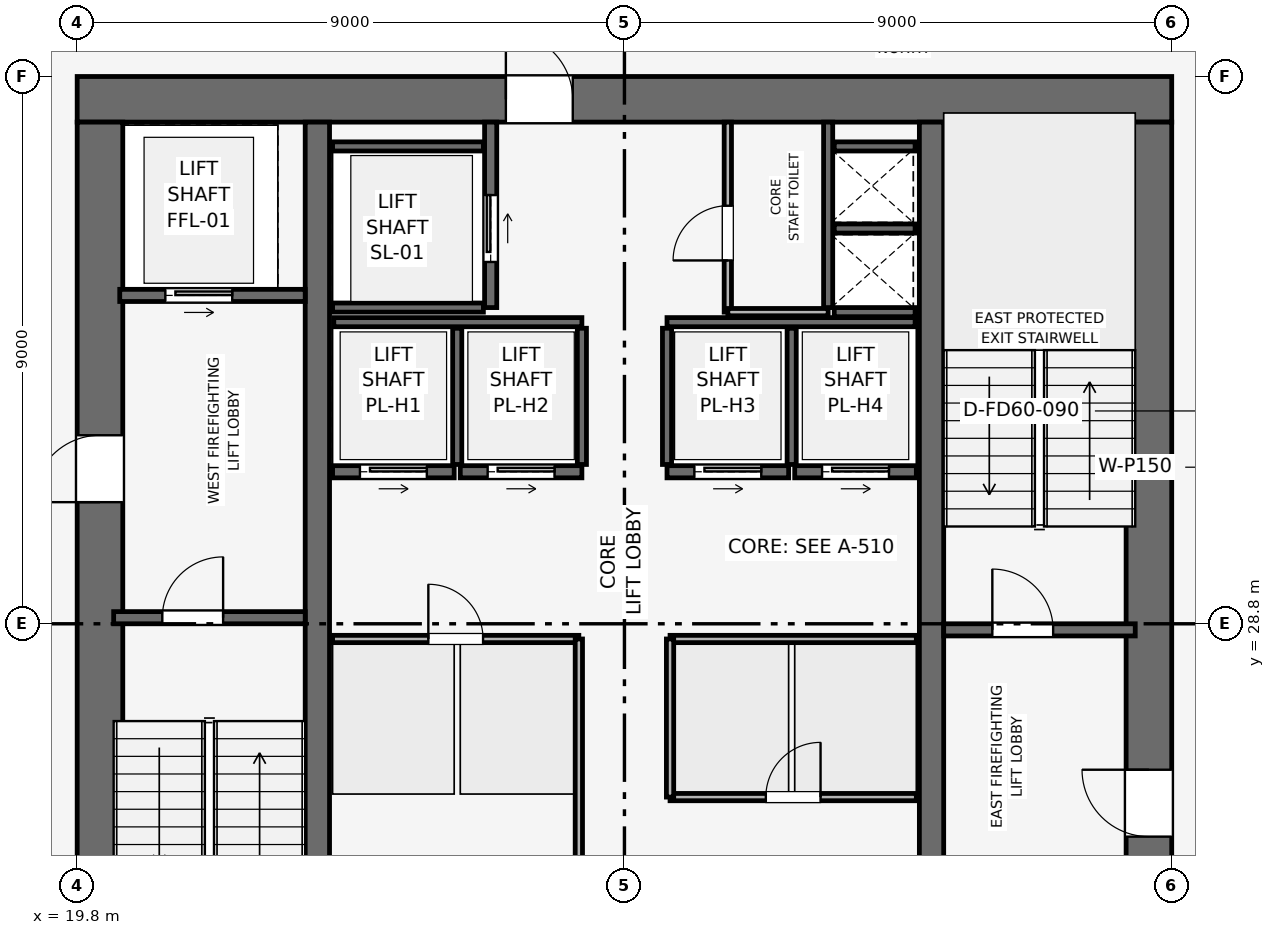
"""IFC4 building model, lengths in metres.
Left out: names, types, materials, properties, quantities, classifications, styles, units other than length and angle.
Written with IfcOpenShell. Run it as: python <this file> out.ifc"""

import sys

from ifc_helpers import new_model, si_unit, direction, frame, frame_2d, origin, place, context, subcontext, project, spatial, rectangle, extrude, element, fill, save


model = new_model("IFC4")
c1 = context("Model", 3, precision=1e-05, world=origin(), true_north=direction((0.0, 1.0)))
c2 = subcontext(c1, "Body", "Model", "MODEL_VIEW")
j1 = project(units=[si_unit("LENGTHUNIT", "METRE"), si_unit("PLANEANGLEUNIT", "RADIAN")], contexts=[c1])
p1 = place(None, origin())
s1 = spatial("IfcSite", under=j1, at=p1, CompositionType="ELEMENT")
p2 = place(p1, origin())
s2 = spatial("IfcBuilding", under=s1, at=p2, CompositionType="ELEMENT")
p3 = place(p2, frame((0.0, 0.0, 254.1)))
s3 = spatial("IfcBuildingStorey", under=s2, at=p3, CompositionType="ELEMENT", Elevation=254.1)
p4 = place(p3, frame((19.8, 37.425, 0.0), z_axis=(0.0, 0.0, 1.0), x_axis=(1.0, 0.0, 0.0)))
e1 = element("IfcWall", 1, at=p4, inside=s3, PredefinedType="SHEAR", context=c2, shape_type="SweptSolid", body=[
    extrude(rectangle(XDim=18.0, YDim=0.75, at=frame_2d((9.0, 0.0))), origin(), (0.0, 0.0, 1.0), 3.75),
])
p5 = place(p4, frame((7.05, 0.0, 0.0)))
e2 = element("IfcOpeningElement", 2, at=p5, cuts=e1, PredefinedType="OPENING", context=c2, shape_type="SweptSolid", body=[
    extrude(rectangle(XDim=1.1, YDim=2.15, at=frame_2d((0.55, 1.075))), frame((0.0, 0.385, 0.0), z_axis=(0.0, -1.0, 0.0), x_axis=(1.0, 0.0, 0.0)), (0.0, 0.0, 1.0), 0.77),
])
p6 = place(p3, frame((20.175, 20.55, 0.0), z_axis=(0.0, 0.0, 1.0), x_axis=(0.0, 1.0, 0.0)))
e3 = element("IfcWall", 3, at=p6, inside=s3, PredefinedType="SHEAR", context=c2, shape_type="SweptSolid", body=[
    extrude(rectangle(XDim=16.5, YDim=0.75, at=frame_2d((8.25, 0.0))), origin(), (0.0, 0.0, 1.0), 3.75),
])
p7 = place(p6, frame((10.25, 0.0, 0.0)))
e4 = element("IfcOpeningElement", 4, at=p7, cuts=e3, PredefinedType="OPENING", context=c2, shape_type="SweptSolid", body=[
    extrude(rectangle(XDim=1.1, YDim=2.15, at=frame_2d((0.55, 1.075))), frame((0.0, 0.385, 0.0), z_axis=(0.0, -1.0, 0.0), x_axis=(1.0, 0.0, 0.0)), (0.0, 0.0, 1.0), 0.77),
])
p8 = place(p3, frame((37.425, 20.55, 0.0), z_axis=(0.0, 0.0, 1.0), x_axis=(0.0, 1.0, 0.0)))
e5 = element("IfcWall", 5, at=p8, inside=s3, PredefinedType="SHEAR", context=c2, shape_type="SweptSolid", body=[
    extrude(rectangle(XDim=16.5, YDim=0.75, at=frame_2d((8.25, 0.0))), origin(), (0.0, 0.0, 1.0), 3.75),
])
p9 = place(p8, frame((4.75, 0.0, 0.0)))
e6 = element("IfcOpeningElement", 6, at=p9, cuts=e5, PredefinedType="OPENING", context=c2, shape_type="SweptSolid", body=[
    extrude(rectangle(XDim=1.1, YDim=2.15, at=frame_2d((0.55, 1.075))), frame((0.0, 0.385, 0.0), z_axis=(0.0, -1.0, 0.0), x_axis=(1.0, 0.0, 0.0)), (0.0, 0.0, 1.0), 0.77),
])
for number, where, z_axis, x_axis in (
    (7, (23.75, 20.55, 0.0), (0.0, 0.0, 1.0), (0.0, 1.0, 0.0)),
    (8, (33.85, 20.55, 0.0), (0.0, 0.0, 1.0), (0.0, 1.0, 0.0)),
):
    element("IfcWall", number, at=place(p3, frame(where, z_axis=z_axis, x_axis=x_axis)), inside=s3, PredefinedType="SHEAR", context=c2, shape_type="SweptSolid", body=[
        extrude(rectangle(XDim=16.5, YDim=0.4, at=frame_2d((8.25, 0.0))), origin(), (0.0, 0.0, 1.0), 3.75),
    ])
p10 = place(p3, frame((20.4, 28.9, 0.0), z_axis=(0.0, 0.0, 1.0), x_axis=(1.0, 0.0, 0.0)))
e9 = element("IfcWall", 9, at=p10, inside=s3, PredefinedType="SHEAR", context=c2, shape_type="SweptSolid", body=[
    extrude(rectangle(XDim=3.15, YDim=0.2, at=frame_2d((1.575, 0.0))), origin(), (0.0, 0.0, 1.0), 3.5),
])
p11 = place(p10, frame((0.8, 0.0, 0.0)))
e10 = element("IfcOpeningElement", 10, at=p11, cuts=e9, PredefinedType="OPENING", context=c2, shape_type="SweptSolid", body=[
    extrude(rectangle(XDim=1.0, YDim=2.1, at=frame_2d((0.5, 1.05))), frame((0.0, 0.11, 0.0), z_axis=(0.0, -1.0, 0.0), x_axis=(1.0, 0.0, 0.0)), (0.0, 0.0, 1.0), 0.22),
])
p12 = place(p3, frame((34.05, 28.7, 0.0), z_axis=(0.0, 0.0, 1.0), x_axis=(1.0, 0.0, 0.0)))
e11 = element("IfcWall", 11, at=p12, inside=s3, PredefinedType="SHEAR", context=c2, shape_type="SweptSolid", body=[
    extrude(rectangle(XDim=3.15, YDim=0.2, at=frame_2d((1.575, 0.0))), origin(), (0.0, 0.0, 1.0), 3.5),
])
p13 = place(p12, frame((0.8, 0.0, 0.0)))
e12 = element("IfcOpeningElement", 12, at=p13, cuts=e11, PredefinedType="OPENING", context=c2, shape_type="SweptSolid", body=[
    extrude(rectangle(XDim=1.0, YDim=2.1, at=frame_2d((0.5, 1.05))), frame((0.0, 0.11, 0.0), z_axis=(0.0, -1.0, 0.0), x_axis=(1.0, 0.0, 0.0)), (0.0, 0.0, 1.0), 0.22),
])
p14 = place(p3, frame((32.15, 34.0, 0.0), z_axis=(0.0, 0.0, 1.0), x_axis=(0.0, 1.0, 0.0)))
e13 = element("IfcWall", 13, at=p14, inside=s3, PredefinedType="SHEAR", context=c2, shape_type="SweptSolid", body=[
    extrude(rectangle(XDim=3.05, YDim=0.15, at=frame_2d((1.525, 0.0))), origin(), (0.0, 0.0, 1.0), 3.5),
])
for number, where, z_axis, x_axis in (
    (14, (32.25, 33.925, 0.0), (0.0, 0.0, 1.0), (1.0, 0.0, 0.0)),
    (15, (32.25, 35.3, 0.0), (0.0, 0.0, 1.0), (1.0, 0.0, 0.0)),
):
    element("IfcWall", number, at=place(p3, frame(where, z_axis=z_axis, x_axis=x_axis)), inside=s3, PredefinedType="SHEAR", context=c2, shape_type="SweptSolid", body=[
        extrude(rectangle(XDim=1.33, YDim=0.15, at=frame_2d((0.665, 0.0))), origin(), (0.0, 0.0, 1.0), 3.5),
    ])
p15 = place(p3, frame((20.5, 34.2, 0.0), z_axis=(0.0, 0.0, 1.0), x_axis=(1.0, 0.0, 0.0)))
e16 = element("IfcWall", 16, at=p15, inside=s3, PredefinedType="SHEAR", context=c2, shape_type="SweptSolid", body=[
    extrude(rectangle(XDim=3.05, YDim=0.2, at=frame_2d((1.525, 0.0))), origin(), (0.0, 0.0, 1.0), 3.5),
])
p16 = place(p15, frame((0.75, 0.0, 0.0)))
e17 = element("IfcOpeningElement", 17, at=p16, cuts=e16, PredefinedType="OPENING", context=c2, shape_type="SweptSolid", body=[
    extrude(rectangle(XDim=1.1, YDim=2.15, at=frame_2d((0.55, 1.075))), frame((0.0, 0.11, 0.0), z_axis=(0.0, -1.0, 0.0), x_axis=(1.0, 0.0, 0.0)), (0.0, 0.0, 1.0), 0.22),
])
p17 = place(p3, frame((26.6, 34.0, 0.0), z_axis=(0.0, 0.0, 1.0), x_axis=(0.0, 1.0, 0.0)))
e18 = element("IfcWall", 18, at=p17, inside=s3, PredefinedType="SHEAR", context=c2, shape_type="SweptSolid", body=[
    extrude(rectangle(XDim=3.05, YDim=0.2, at=frame_2d((1.525, 0.0))), origin(), (0.0, 0.0, 1.0), 3.5),
])
p18 = place(p17, frame((0.75, 0.0, 0.0)))
e19 = element("IfcOpeningElement", 19, at=p18, cuts=e18, PredefinedType="OPENING", context=c2, shape_type="SweptSolid", body=[
    extrude(rectangle(XDim=1.1, YDim=2.15, at=frame_2d((0.55, 1.075))), frame((0.0, 0.11, 0.0), z_axis=(0.0, -1.0, 0.0), x_axis=(1.0, 0.0, 0.0)), (0.0, 0.0, 1.0), 0.22),
])
for number, where, z_axis, x_axis in (
    (20, (24.0, 34.0, 0.0), (0.0, 0.0, 1.0), (1.0, 0.0, 0.0)),
    (21, (24.0, 36.65, 0.0), (0.0, 0.0, 1.0), (1.0, 0.0, 0.0)),
):
    element("IfcWall", number, at=place(p3, frame(where, z_axis=z_axis, x_axis=x_axis)), inside=s3, PredefinedType="SHEAR", context=c2, shape_type="SweptSolid", body=[
        extrude(rectangle(XDim=2.48, YDim=0.15, at=frame_2d((1.24, 0.0))), origin(), (0.0, 0.0, 1.0), 3.5),
    ])
p19 = place(p3, frame((24.0, 31.3, 0.0), z_axis=(0.0, 0.0, 1.0), x_axis=(1.0, 0.0, 0.0)))
e22 = element("IfcWall", 22, at=p19, inside=s3, PredefinedType="SHEAR", context=c2, shape_type="SweptSolid", body=[
    extrude(rectangle(XDim=2.0, YDim=0.2, at=frame_2d((1.0, 0.0))), origin(), (0.0, 0.0, 1.0), 3.5),
])
p20 = place(p19, frame((0.45, 0.0, 0.0)))
e23 = element("IfcOpeningElement", 23, at=p20, cuts=e22, PredefinedType="OPENING", context=c2, shape_type="SweptSolid", body=[
    extrude(rectangle(XDim=1.1, YDim=2.15, at=frame_2d((0.55, 1.075))), frame((0.0, 0.11, 0.0), z_axis=(0.0, -1.0, 0.0), x_axis=(1.0, 0.0, 0.0)), (0.0, 0.0, 1.0), 0.22),
])
p21 = place(p3, frame((26.1, 31.3, 0.0), z_axis=(0.0, 0.0, 1.0), x_axis=(1.0, 0.0, 0.0)))
e24 = element("IfcWall", 24, at=p21, inside=s3, PredefinedType="SHEAR", context=c2, shape_type="SweptSolid", body=[
    extrude(rectangle(XDim=2.0, YDim=0.2, at=frame_2d((1.0, 0.0))), origin(), (0.0, 0.0, 1.0), 3.5),
])
p22 = place(p21, frame((0.45, 0.0, 0.0)))
e25 = element("IfcOpeningElement", 25, at=p22, cuts=e24, PredefinedType="OPENING", context=c2, shape_type="SweptSolid", body=[
    extrude(rectangle(XDim=1.1, YDim=2.15, at=frame_2d((0.55, 1.075))), frame((0.0, 0.11, 0.0), z_axis=(0.0, -1.0, 0.0), x_axis=(1.0, 0.0, 0.0)), (0.0, 0.0, 1.0), 0.22),
])
p23 = place(p3, frame((29.5, 31.3, 0.0), z_axis=(0.0, 0.0, 1.0), x_axis=(1.0, 0.0, 0.0)))
e26 = element("IfcWall", 26, at=p23, inside=s3, PredefinedType="SHEAR", context=c2, shape_type="SweptSolid", body=[
    extrude(rectangle(XDim=2.0, YDim=0.2, at=frame_2d((1.0, 0.0))), origin(), (0.0, 0.0, 1.0), 3.5),
])
p24 = place(p23, frame((0.45, 0.0, 0.0)))
e27 = element("IfcOpeningElement", 27, at=p24, cuts=e26, PredefinedType="OPENING", context=c2, shape_type="SweptSolid", body=[
    extrude(rectangle(XDim=1.1, YDim=2.15, at=frame_2d((0.55, 1.075))), frame((0.0, 0.11, 0.0), z_axis=(0.0, -1.0, 0.0), x_axis=(1.0, 0.0, 0.0)), (0.0, 0.0, 1.0), 0.22),
])
p25 = place(p3, frame((31.6, 31.3, 0.0), z_axis=(0.0, 0.0, 1.0), x_axis=(1.0, 0.0, 0.0)))
e28 = element("IfcWall", 28, at=p25, inside=s3, PredefinedType="SHEAR", context=c2, shape_type="SweptSolid", body=[
    extrude(rectangle(XDim=2.0, YDim=0.2, at=frame_2d((1.0, 0.0))), origin(), (0.0, 0.0, 1.0), 3.5),
])
p26 = place(p25, frame((0.45, 0.0, 0.0)))
e29 = element("IfcOpeningElement", 29, at=p26, cuts=e28, PredefinedType="OPENING", context=c2, shape_type="SweptSolid", body=[
    extrude(rectangle(XDim=1.1, YDim=2.15, at=frame_2d((0.55, 1.075))), frame((0.0, 0.11, 0.0), z_axis=(0.0, -1.0, 0.0), x_axis=(1.0, 0.0, 0.0)), (0.0, 0.0, 1.0), 0.22),
])
p27 = place(p3, frame((32.25, 36.65, 0.0), z_axis=(0.0, 0.0, 1.0), x_axis=(1.0, 0.0, 0.0)))
e30 = element("IfcWall", 30, at=p27, inside=s3, PredefinedType="SHEAR", context=c2, shape_type="SweptSolid", body=[
    extrude(rectangle(XDim=1.33, YDim=0.15, at=frame_2d((0.665, 0.0))), origin(), (0.0, 0.0, 1.0), 3.5),
])
for number, where, z_axis, x_axis in (
    (31, (24.02, 33.76, 0.0), (0.0, 0.0, 1.0), (1.0, 0.0, 0.0)),
    (32, (29.5, 33.76, 0.0), (0.0, 0.0, 1.0), (1.0, 0.0, 0.0)),
):
    element("IfcWall", number, at=place(p3, frame(where, z_axis=z_axis, x_axis=x_axis)), inside=s3, PredefinedType="SHEAR", context=c2, shape_type="SweptSolid", body=[
        extrude(rectangle(XDim=4.08, YDim=0.15, at=frame_2d((2.04, 0.0))), origin(), (0.0, 0.0, 1.0), 3.5),
    ])
for number, where, z_axis, x_axis in (
    (33, (26.05, 31.42, 0.0), (0.0, 0.0, 1.0), (0.0, 1.0, 0.0)),
    (34, (28.1, 31.42, 0.0), (0.0, 0.0, 1.0), (0.0, 1.0, 0.0)),
    (35, (29.5, 31.42, 0.0), (0.0, 0.0, 1.0), (0.0, 1.0, 0.0)),
    (36, (31.55, 31.42, 0.0), (0.0, 0.0, 1.0), (0.0, 1.0, 0.0)),
):
    element("IfcWall", number, at=place(p3, frame(where, z_axis=z_axis, x_axis=x_axis)), inside=s3, PredefinedType="SHEAR", context=c2, shape_type="SweptSolid", body=[
        extrude(rectangle(XDim=2.24, YDim=0.15, at=frame_2d((1.12, 0.0))), origin(), (0.0, 0.0, 1.0), 3.5),
    ])
p28 = place(p3, frame((30.5, 33.925, 0.0), z_axis=(0.0, 0.0, 1.0), x_axis=(0.0, 1.0, 0.0)))
e37 = element("IfcWall", 37, at=p28, inside=s3, PredefinedType="PARTITIONING", context=c2, shape_type="SweptSolid", body=[
    extrude(rectangle(XDim=3.125, YDim=0.12, at=frame_2d((1.562, 0.0))), origin(), (0.0, 0.0, 1.0), 3.5),
])
p29 = place(p28, frame((0.85, 0.0, 0.0)))
e38 = element("IfcOpeningElement", 38, at=p29, cuts=e37, PredefinedType="OPENING", context=c2, shape_type="SweptSolid", body=[
    extrude(rectangle(XDim=0.9, YDim=2.1, at=frame_2d((0.45, 1.05))), frame((0.0, 0.07, 0.0), z_axis=(0.0, -1.0, 0.0), x_axis=(1.0, 0.0, 0.0)), (0.0, 0.0, 1.0), 0.14),
])
p30 = place(p3, frame((30.5, 33.925, 0.0), z_axis=(0.0, 0.0, 1.0), x_axis=(1.0, 0.0, 0.0)))
e39 = element("IfcWall", 39, at=p30, inside=s3, PredefinedType="PARTITIONING", context=c2, shape_type="SweptSolid", body=[
    extrude(rectangle(XDim=1.65, YDim=0.12, at=frame_2d((0.825, 0.0))), origin(), (0.0, 0.0, 1.0), 3.5),
])
p31 = place(p3, frame((24.0, 28.55, 0.0), z_axis=(0.0, 0.0, 1.0), x_axis=(1.0, 0.0, 0.0)))
e40 = element("IfcWall", 40, at=p31, inside=s3, PredefinedType="PARTITIONING", context=c2, shape_type="SweptSolid", body=[
    extrude(rectangle(XDim=4.05, YDim=0.12, at=frame_2d((2.025, 0.0))), origin(), (0.0, 0.0, 1.0), 3.5),
])
p32 = place(p31, frame((1.575, 0.0, 0.0)))
e41 = element("IfcOpeningElement", 41, at=p32, cuts=e40, PredefinedType="OPENING", context=c2, shape_type="SweptSolid", body=[
    extrude(rectangle(XDim=0.9, YDim=2.1, at=frame_2d((0.45, 1.05))), frame((0.0, 0.07, 0.0), z_axis=(0.0, -1.0, 0.0), x_axis=(1.0, 0.0, 0.0)), (0.0, 0.0, 1.0), 0.14),
])
p33 = place(p3, frame((28.05, 20.4, 0.0), z_axis=(0.0, 0.0, 1.0), x_axis=(0.0, 1.0, 0.0)))
e42 = element("IfcWall", 42, at=p33, inside=s3, PredefinedType="PARTITIONING", context=c2, shape_type="SweptSolid", body=[
    extrude(rectangle(XDim=8.15, YDim=0.12, at=frame_2d((4.075, 0.0))), origin(), (0.0, 0.0, 1.0), 3.5),
])
p34 = place(p3, frame((29.55, 25.95, 0.0), z_axis=(0.0, 0.0, 1.0), x_axis=(1.0, 0.0, 0.0)))
e43 = element("IfcWall", 43, at=p34, inside=s3, PredefinedType="PARTITIONING", context=c2, shape_type="SweptSolid", body=[
    extrude(rectangle(XDim=4.05, YDim=0.12, at=frame_2d((2.025, 0.0))), origin(), (0.0, 0.0, 1.0), 3.5),
])
p35 = place(p34, frame((1.575, 0.0, 0.0)))
e44 = element("IfcOpeningElement", 44, at=p35, cuts=e43, PredefinedType="OPENING", context=c2, shape_type="SweptSolid", body=[
    extrude(rectangle(XDim=0.9, YDim=2.1, at=frame_2d((0.45, 1.05))), frame((0.0, 0.07, 0.0), z_axis=(0.0, -1.0, 0.0), x_axis=(1.0, 0.0, 0.0)), (0.0, 0.0, 1.0), 0.14),
])
p36 = place(p3, frame((29.55, 28.55, 0.0), z_axis=(0.0, 0.0, 1.0), x_axis=(1.0, 0.0, 0.0)))
e45 = element("IfcWall", 45, at=p36, inside=s3, PredefinedType="PARTITIONING", context=c2, shape_type="SweptSolid", body=[
    extrude(rectangle(XDim=4.05, YDim=0.12, at=frame_2d((2.025, 0.0))), origin(), (0.0, 0.0, 1.0), 3.5),
])
p37 = place(p3, frame((29.55, 25.95, 0.0), z_axis=(0.0, 0.0, 1.0), x_axis=(0.0, 1.0, 0.0)))
e46 = element("IfcWall", 46, at=p37, inside=s3, PredefinedType="PARTITIONING", context=c2, shape_type="SweptSolid", body=[
    extrude(rectangle(XDim=2.6, YDim=0.12, at=frame_2d((1.3, 0.0))), origin(), (0.0, 0.0, 1.0), 3.5),
])
p38 = place(p11, origin())
e47 = element("IfcDoor", 47, at=p38, inside=s3, OperationType="SINGLE_SWING_RIGHT", PredefinedType="DOOR", context=c2, shape_type="SweptSolid", body=[
    extrude(rectangle(XDim=1.0, YDim=2.1, at=frame_2d((0.5, 1.05))), frame((0.0, 0.025, 0.0), z_axis=(0.0, -1.0, 0.0), x_axis=(1.0, 0.0, 0.0)), (0.0, 0.0, 1.0), 0.05),
])
fill(e10, e47)
p39 = place(p13, origin())
e48 = element("IfcDoor", 48, at=p39, inside=s3, OperationType="SINGLE_SWING_LEFT", PredefinedType="DOOR", context=c2, shape_type="SweptSolid", body=[
    extrude(rectangle(XDim=1.0, YDim=2.1, at=frame_2d((0.5, 1.05))), frame((0.0, 0.025, 0.0), z_axis=(0.0, -1.0, 0.0), x_axis=(1.0, 0.0, 0.0)), (0.0, 0.0, 1.0), 0.05),
])
fill(e12, e48)
p40 = place(p16, origin())
e49 = element("IfcDoor", 49, at=p40, inside=s3, OperationType="SLIDING_TO_RIGHT", PredefinedType="DOOR", context=c2, shape_type="SweptSolid", body=[
    extrude(rectangle(XDim=1.1, YDim=2.15, at=frame_2d((0.55, 1.075))), frame((0.0, 0.025, 0.0), z_axis=(0.0, -1.0, 0.0), x_axis=(1.0, 0.0, 0.0)), (0.0, 0.0, 1.0), 0.05),
])
fill(e17, e49)
p41 = place(p18, origin())
e50 = element("IfcDoor", 50, at=p41, inside=s3, OperationType="SLIDING_TO_RIGHT", PredefinedType="DOOR", context=c2, shape_type="SweptSolid", body=[
    extrude(rectangle(XDim=1.1, YDim=2.15, at=frame_2d((0.55, 1.075))), frame((0.0, 0.025, 0.0), z_axis=(0.0, -1.0, 0.0), x_axis=(1.0, 0.0, 0.0)), (0.0, 0.0, 1.0), 0.05),
])
fill(e19, e50)
p42 = place(p20, origin())
e51 = element("IfcDoor", 51, at=p42, inside=s3, OperationType="SLIDING_TO_RIGHT", PredefinedType="DOOR", context=c2, shape_type="SweptSolid", body=[
    extrude(rectangle(XDim=1.1, YDim=2.15, at=frame_2d((0.55, 1.075))), frame((0.0, 0.025, 0.0), z_axis=(0.0, -1.0, 0.0), x_axis=(1.0, 0.0, 0.0)), (0.0, 0.0, 1.0), 0.05),
])
fill(e23, e51)
p43 = place(p22, origin())
e52 = element("IfcDoor", 52, at=p43, inside=s3, OperationType="SLIDING_TO_RIGHT", PredefinedType="DOOR", context=c2, shape_type="SweptSolid", body=[
    extrude(rectangle(XDim=1.1, YDim=2.15, at=frame_2d((0.55, 1.075))), frame((0.0, 0.025, 0.0), z_axis=(0.0, -1.0, 0.0), x_axis=(1.0, 0.0, 0.0)), (0.0, 0.0, 1.0), 0.05),
])
fill(e25, e52)
p44 = place(p24, origin())
e53 = element("IfcDoor", 53, at=p44, inside=s3, OperationType="SLIDING_TO_RIGHT", PredefinedType="DOOR", context=c2, shape_type="SweptSolid", body=[
    extrude(rectangle(XDim=1.1, YDim=2.15, at=frame_2d((0.55, 1.075))), frame((0.0, 0.025, 0.0), z_axis=(0.0, -1.0, 0.0), x_axis=(1.0, 0.0, 0.0)), (0.0, 0.0, 1.0), 0.05),
])
fill(e27, e53)
p45 = place(p26, origin())
e54 = element("IfcDoor", 54, at=p45, inside=s3, OperationType="SLIDING_TO_RIGHT", PredefinedType="DOOR", context=c2, shape_type="SweptSolid", body=[
    extrude(rectangle(XDim=1.1, YDim=2.15, at=frame_2d((0.55, 1.075))), frame((0.0, 0.025, 0.0), z_axis=(0.0, -1.0, 0.0), x_axis=(1.0, 0.0, 0.0)), (0.0, 0.0, 1.0), 0.05),
])
fill(e29, e54)
p46 = place(p29, origin())
e55 = element("IfcDoor", 55, at=p46, inside=s3, OperationType="SINGLE_SWING_LEFT", PredefinedType="DOOR", context=c2, shape_type="SweptSolid", body=[
    extrude(rectangle(XDim=0.9, YDim=2.1, at=frame_2d((0.45, 1.05))), frame((0.0, 0.025, 0.0), z_axis=(0.0, -1.0, 0.0), x_axis=(1.0, 0.0, 0.0)), (0.0, 0.0, 1.0), 0.05),
])
fill(e38, e55)
p47 = place(p32, origin())
e56 = element("IfcDoor", 56, at=p47, inside=s3, OperationType="SINGLE_SWING_LEFT", PredefinedType="DOOR", context=c2, shape_type="SweptSolid", body=[
    extrude(rectangle(XDim=0.9, YDim=2.1, at=frame_2d((0.45, 1.05))), frame((0.0, 0.025, 0.0), z_axis=(0.0, -1.0, 0.0), x_axis=(1.0, 0.0, 0.0)), (0.0, 0.0, 1.0), 0.05),
])
fill(e41, e56)
p48 = place(p35, origin())
e57 = element("IfcDoor", 57, at=p48, inside=s3, OperationType="SINGLE_SWING_RIGHT", PredefinedType="DOOR", context=c2, shape_type="SweptSolid", body=[
    extrude(rectangle(XDim=0.9, YDim=2.1, at=frame_2d((0.45, 1.05))), frame((0.0, 0.025, 0.0), z_axis=(0.0, -1.0, 0.0), x_axis=(1.0, 0.0, 0.0)), (0.0, 0.0, 1.0), 0.05),
])
fill(e44, e57)
p49 = place(p7, origin())
e58 = element("IfcDoor", 58, at=p49, inside=s3, OperationType="SINGLE_SWING_LEFT", PredefinedType="DOOR", context=c2, shape_type="SweptSolid", body=[
    extrude(rectangle(XDim=1.1, YDim=2.15, at=frame_2d((0.55, 1.075))), frame((0.0, 0.025, 0.0), z_axis=(0.0, -1.0, 0.0), x_axis=(1.0, 0.0, 0.0)), (0.0, 0.0, 1.0), 0.05),
])
fill(e4, e58)
p50 = place(p9, origin())
e59 = element("IfcDoor", 59, at=p50, inside=s3, OperationType="SINGLE_SWING_RIGHT", PredefinedType="DOOR", context=c2, shape_type="SweptSolid", body=[
    extrude(rectangle(XDim=1.1, YDim=2.15, at=frame_2d((0.55, 1.075))), frame((0.0, 0.025, 0.0), z_axis=(0.0, -1.0, 0.0), x_axis=(1.0, 0.0, 0.0)), (0.0, 0.0, 1.0), 0.05),
])
fill(e6, e59)
p51 = place(p5, origin())
e60 = element("IfcDoor", 60, at=p51, inside=s3, OperationType="SINGLE_SWING_LEFT", PredefinedType="DOOR", context=c2, shape_type="SweptSolid", body=[
    extrude(rectangle(XDim=1.1, YDim=2.15, at=frame_2d((0.55, 1.075))), frame((0.0, 0.025, 0.0), z_axis=(0.0, -1.0, 0.0), x_axis=(1.0, 0.0, 0.0)), (0.0, 0.0, 1.0), 0.05),
])
fill(e2, e60)
save(model, sys.argv[1])
